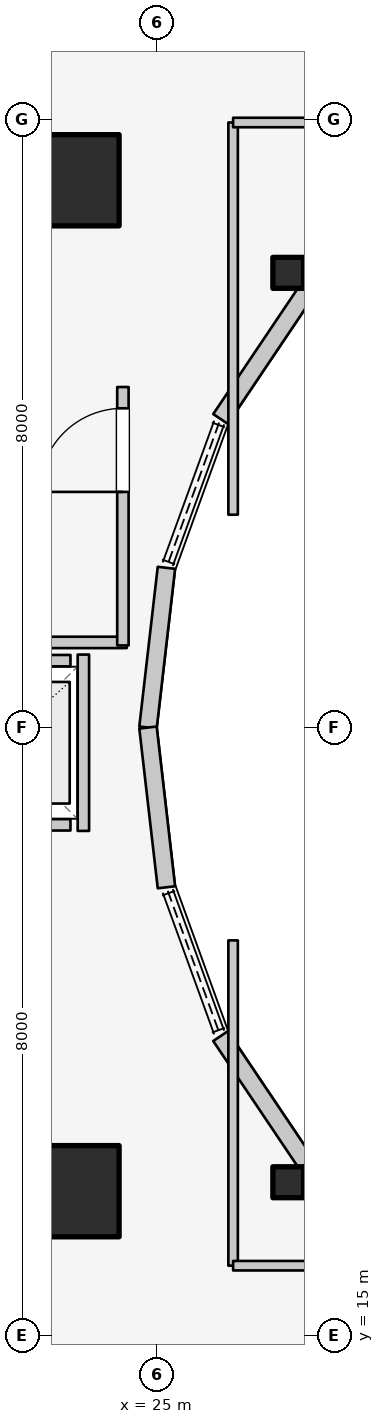
"""IFC4 building model, lengths in metres.
Left out: names, types, materials, properties, quantities, classifications, styles, units other than length and angle.
Written with IfcOpenShell. Run it as: python <this file> out.ifc"""

import sys

from ifc_helpers import new_model, si_unit, direction, frame, frame_2d, origin, origin_2d, place, context, subcontext, project, spatial, rectangle, i_section, extrude, element, fill, save


model = new_model("IFC4")
c1 = context("Model", 3, precision=1e-05, world=origin(), true_north=direction((0.0, 1.0)))
c2 = subcontext(c1, "Body", "Model", "MODEL_VIEW")
j1 = project(units=[si_unit("LENGTHUNIT", "METRE"), si_unit("PLANEANGLEUNIT", "RADIAN")], contexts=[c1])
p1 = place(None, origin())
s1 = spatial("IfcSite", under=j1, at=p1, CompositionType="ELEMENT")
p2 = place(p1, origin())
s2 = spatial("IfcBuilding", under=s1, at=p2, CompositionType="ELEMENT")
p3 = place(p2, frame((0.0, 0.0, 253.2)))
s3 = spatial("IfcBuildingStorey", under=s2, at=p3, CompositionType="ELEMENT", Elevation=253.2)
for number, where, z_axis, x_axis in (
    (1, (19.65, 16.55, 0.0), (0.0, 0.0, 1.0), (1.0, 0.0, 0.0)),
    (2, (19.65, 30.35, 0.0), (0.0, 0.0, 1.0), (1.0, 0.0, 0.0)),
):
    element("IfcWall", number, at=place(p3, frame(where, z_axis=z_axis, x_axis=x_axis)), inside=s3, PredefinedType="SHEAR", context=c2, shape_type="SweptSolid", body=[
        extrude(rectangle(XDim=4.5, YDim=0.45, at=frame_2d((2.25, 0.0))), origin(), (0.0, 0.0, 1.0), 3.6),
    ])
for number, where, z_axis, x_axis in (
    (3, (23.9, 16.9, 0.0), (0.0, 0.0, 1.0), (1.0, 0.0, 0.0)),
    (4, (23.9, 30.2, 0.0), (0.0, 0.0, 1.0), (1.0, 0.0, 0.0)),
):
    element("IfcColumn", number, at=place(p3, frame(where, z_axis=z_axis, x_axis=x_axis)), inside=s3, PredefinedType="COLUMN", context=c2, shape_type="SweptSolid", body=[
        extrude(rectangle(XDim=1.2, YDim=1.2, at=origin_2d()), origin(), (0.0, 0.0, 1.0), 3.6),
    ])
for number, where, z_axis, x_axis in (
    (5, (26.725, 28.982, 0.0), (0.0, 0.0, 1.0), (1.0, 0.0, 0.0)),
    (6, (26.725, 17.018, 0.0), (0.0, 0.0, 1.0), (1.0, 0.0, 0.0)),
):
    element("IfcColumn", number, at=place(p3, frame(where, z_axis=z_axis, x_axis=x_axis)), inside=s3, PredefinedType="COLUMN", context=c2, shape_type="SweptSolid", body=[
        extrude(i_section(OverallWidth=0.404, OverallDepth=0.407, WebThickness=0.027, FlangeThickness=0.044, FilletRadius=0.025, at=origin_2d()), origin(), (0.0, 0.0, 1.0), 3.6),
    ])
p4 = place(p3, frame((28.44, 30.032, 0.0), z_axis=(0.0, 0.0, 1.0), x_axis=(-0.752576694707, -0.658504607869, 0.0)))
e7 = element("IfcWall", 7, at=p4, inside=s3, PredefinedType="STANDARD", context=c2, shape_type="SweptSolid", body=[
    extrude(rectangle(XDim=1.959, YDim=0.23, at=frame_2d((0.98, 0.0))), origin(), (0.0, 0.0, 1.0), 2.6),
])
p5 = place(p3, frame((26.965, 28.742, 0.0), z_axis=(0.0, 0.0, 1.0), x_axis=(-0.558197800898, -0.829707909492, 0.0)))
e8 = element("IfcWall", 8, at=p5, inside=s3, PredefinedType="STANDARD", context=c2, shape_type="SweptSolid", body=[
    extrude(rectangle(XDim=2.027, YDim=0.23, at=frame_2d((1.013, 0.0))), origin(), (0.0, 0.0, 1.0), 2.6),
])
for number, where, z_axis, x_axis in (
    (9, (25.123, 25.102, 0.0), (0.0, 0.0, 1.0), (-0.115, -0.993, 0.0)),
    (10, (24.88, 23.0, 0.0), (0.0, 0.0, 1.0), (0.115, -0.993, 0.0)),
):
    element("IfcWall", number, at=place(p3, frame(where, z_axis=z_axis, x_axis=x_axis)), inside=s3, PredefinedType="STANDARD", context=c2, shape_type="SweptSolid", body=[
        extrude(rectangle(XDim=2.115, YDim=0.23, at=frame_2d((1.058, 0.0))), origin(), (0.0, 0.0, 1.0), 3.28),
    ])
p6 = place(p3, frame((25.834, 18.94, 0.0), z_axis=(0.0, 0.0, 1.0), x_axis=(0.558197800898, -0.829707909492, 0.0)))
e11 = element("IfcWall", 11, at=p6, inside=s3, PredefinedType="STANDARD", context=c2, shape_type="SweptSolid", body=[
    extrude(rectangle(XDim=2.027, YDim=0.23, at=frame_2d((1.013, 0.0))), origin(), (0.0, 0.0, 1.0), 2.6),
])
p7 = place(p3, frame((26.965, 17.258, 0.0), z_axis=(0.0, 0.0, 1.0), x_axis=(0.752576694707, -0.658504607869, 0.0)))
e12 = element("IfcWall", 12, at=p7, inside=s3, PredefinedType="STANDARD", context=c2, shape_type="SweptSolid", body=[
    extrude(rectangle(XDim=1.959, YDim=0.23, at=frame_2d((0.98, 0.0))), origin(), (0.0, 0.0, 1.0), 2.6),
])
p8 = place(p3, frame((22.04, 21.72, 0.0), z_axis=(0.0, 0.0, 1.0), x_axis=(1.0, 0.0, 0.0)))
e13 = element("IfcWall", 13, at=p8, inside=s3, PredefinedType="SOLIDWALL", context=c2, shape_type="SweptSolid", body=[
    extrude(rectangle(XDim=1.82, YDim=0.15, at=frame_2d((0.91, 0.0))), origin(), (0.0, 0.0, 1.0), 2.62),
])
p9 = place(p8, frame((0.36, 0.0, 0.0)))
e14 = element("IfcOpeningElement", 14, at=p9, cuts=e13, PredefinedType="OPENING", context=c2, shape_type="SweptSolid", body=[
    extrude(rectangle(XDim=1.1, YDim=2.1, at=frame_2d((0.55, 1.05))), frame((0.0, 0.085, 0.0), z_axis=(0.0, -1.0, 0.0), x_axis=(1.0, 0.0, 0.0)), (0.0, 0.0, 1.0), 0.17),
])
p10 = place(p3, frame((22.04, 23.88, 0.0), z_axis=(0.0, 0.0, 1.0), x_axis=(1.0, 0.0, 0.0)))
e15 = element("IfcWall", 15, at=p10, inside=s3, PredefinedType="SOLIDWALL", context=c2, shape_type="SweptSolid", body=[
    extrude(rectangle(XDim=1.82, YDim=0.15, at=frame_2d((0.91, 0.0))), origin(), (0.0, 0.0, 1.0), 2.62),
])
p11 = place(p3, frame((24.03, 21.64, 0.0), z_axis=(0.0, 0.0, 1.0), x_axis=(0.0, 1.0, 0.0)))
e16 = element("IfcWall", 16, at=p11, inside=s3, PredefinedType="SOLIDWALL", context=c2, shape_type="SweptSolid", body=[
    extrude(rectangle(XDim=2.32, YDim=0.15, at=frame_2d((1.16, 0.0))), origin(), (0.0, 0.0, 1.0), 2.62),
])
p12 = place(p3, frame((19.52, 24.12, 0.0), z_axis=(0.0, 0.0, 1.0), x_axis=(1.0, 0.0, 0.0)))
e17 = element("IfcWall", 17, at=p12, inside=s3, PredefinedType="PARTITIONING", context=c2, shape_type="SweptSolid", body=[
    extrude(rectangle(XDim=5.08, YDim=0.15, at=frame_2d((2.54, 0.0))), origin(), (0.0, 0.0, 1.0), 2.62),
])
p13 = place(p3, frame((24.55, 24.08, 0.0), z_axis=(0.0, 0.0, 1.0), x_axis=(0.0, 1.0, 0.0)))
e18 = element("IfcWall", 18, at=p13, inside=s3, PredefinedType="PARTITIONING", context=c2, shape_type="SweptSolid", body=[
    extrude(rectangle(XDim=3.4, YDim=0.15, at=frame_2d((1.7, 0.0))), origin(), (0.0, 0.0, 1.0), 3.295),
])
p14 = place(p13, frame((2.02, 0.0, 0.0)))
e19 = element("IfcOpeningElement", 19, at=p14, cuts=e18, PredefinedType="OPENING", context=c2, shape_type="SweptSolid", body=[
    extrude(rectangle(XDim=1.1, YDim=2.1, at=frame_2d((0.55, 1.05))), frame((0.0, 0.085, 0.0), z_axis=(0.0, -1.0, 0.0), x_axis=(1.0, 0.0, 0.0)), (0.0, 0.0, 1.0), 0.17),
])
p15 = place(p3, frame((28.45, 30.015, 0.0), z_axis=(0.0, 0.0, 1.0), x_axis=(-0.522763432117, 0.852477796802, 0.0)))
e20 = element("IfcWall", 20, at=p15, inside=s3, PredefinedType="PARTITIONING", context=c2, shape_type="SweptSolid", body=[
    extrude(rectangle(XDim=3.269, YDim=0.125, at=frame_2d((1.635, 0.0))), origin(), (0.0, 0.0, 1.0), 2.672),
])
p16 = place(p3, frame((28.45, 15.985, 0.0), z_axis=(0.0, 0.0, 1.0), x_axis=(-0.52592395012, -0.850531597702, 0.0)))
e21 = element("IfcWall", 21, at=p16, inside=s3, PredefinedType="PARTITIONING", context=c2, shape_type="SweptSolid", body=[
    extrude(rectangle(XDim=2.869, YDim=0.125, at=frame_2d((1.435, 0.0))), origin(), (0.0, 0.0, 1.0), 2.672),
])
p17 = place(p3, frame((26.0, 25.8, 0.0), z_axis=(0.0, 0.0, 1.0), x_axis=(0.0, 1.0, 0.0)))
e22 = element("IfcWall", 22, at=p17, inside=s3, PredefinedType="PARTITIONING", context=c2, shape_type="SweptSolid", body=[
    extrude(rectangle(XDim=5.16, YDim=0.125, at=frame_2d((2.58, 0.0))), origin(), (0.0, 0.0, 1.0), 2.672),
])
p18 = place(p3, frame((26.0, 30.96, 0.0), z_axis=(0.0, 0.0, 1.0), x_axis=(1.0, 0.0, 0.0)))
e23 = element("IfcWall", 23, at=p18, inside=s3, PredefinedType="PARTITIONING", context=c2, shape_type="SweptSolid", body=[
    extrude(rectangle(XDim=2.6, YDim=0.125, at=frame_2d((1.3, 0.0))), origin(), (0.0, 0.0, 1.0), 2.816),
])
p19 = place(p3, frame((26.0, 15.92, 0.0), z_axis=(0.0, 0.0, 1.0), x_axis=(0.0, 1.0, 0.0)))
e24 = element("IfcWall", 24, at=p19, inside=s3, PredefinedType="PARTITIONING", context=c2, shape_type="SweptSolid", body=[
    extrude(rectangle(XDim=4.28, YDim=0.125, at=frame_2d((2.14, 0.0))), origin(), (0.0, 0.0, 1.0), 2.672),
])
p20 = place(p3, frame((26.0, 15.92, 0.0), z_axis=(0.0, 0.0, 1.0), x_axis=(1.0, 0.0, 0.0)))
e25 = element("IfcWall", 25, at=p20, inside=s3, PredefinedType="PARTITIONING", context=c2, shape_type="SweptSolid", body=[
    extrude(rectangle(XDim=2.6, YDim=0.125, at=frame_2d((1.3, 0.0))), origin(), (0.0, 0.0, 1.0), 2.672),
])
p21 = place(p14, origin())
e26 = element("IfcDoor", 26, at=p21, inside=s3, OperationType="SINGLE_SWING_LEFT", PredefinedType="DOOR", context=c2, shape_type="SweptSolid", body=[
    extrude(rectangle(XDim=1.1, YDim=2.1, at=frame_2d((0.55, 1.05))), frame((0.0, 0.025, 0.0), z_axis=(0.0, -1.0, 0.0), x_axis=(1.0, 0.0, 0.0)), (0.0, 0.0, 1.0), 0.05),
])
fill(e19, e26)
save(model, sys.argv[1])
